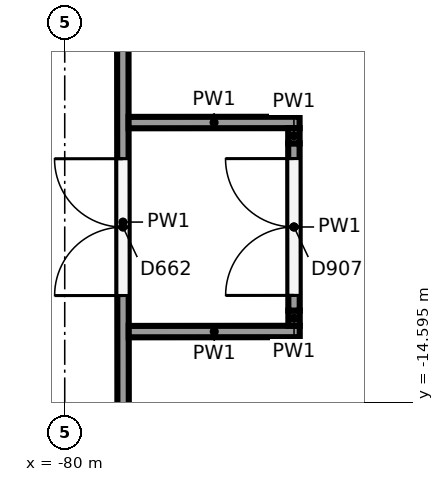
"""IFC4 building model, lengths in metres.
Left out: names, types, materials, properties, quantities, classifications, styles, units other than length and angle.
Written with IfcOpenShell. Run it as: python <this file> out.ifc"""

import sys

from ifc_helpers import new_model, si_unit, direction, frame, frame_2d, origin, place, context, subcontext, project, spatial, rectangle, extrude, element, fill, save


model = new_model("IFC4")
c1 = context("Model", 3, precision=1e-05, world=origin(), true_north=direction((0.0, 1.0)))
c2 = subcontext(c1, "Body", "Model", "MODEL_VIEW")
j1 = project(units=[si_unit("LENGTHUNIT", "METRE"), si_unit("PLANEANGLEUNIT", "RADIAN")], contexts=[c1])
p1 = place(None, origin())
s1 = spatial("IfcSite", under=j1, at=p1, CompositionType="ELEMENT")
p2 = place(p1, origin())
s2 = spatial("IfcBuilding", under=s1, at=p2, CompositionType="ELEMENT")
p3 = place(p2, frame((0.0, 0.0, 6.5)))
s3 = spatial("IfcBuildingStorey", under=s2, at=p3, CompositionType="ELEMENT", Elevation=6.5)
p4 = place(p3, frame((-79.23, -17.64, 0.0), z_axis=(0.0, 0.0, 1.0), x_axis=(-0.0007662833, 0.999999706405, 0.0)))
e1 = element("IfcWall", 1, at=p4, inside=s3, PredefinedType="PARTITIONING", context=c2, shape_type="SweptSolid", body=[
    extrude(rectangle(XDim=10.833, YDim=0.15, at=frame_2d((5.416, 0.0))), origin(), (0.0, 0.0, 1.0), 5.15),
])
p5 = place(p4, frame((4.45, 0.0, 0.0)))
e2 = element("IfcOpeningElement", 2, at=p5, cuts=e1, PredefinedType="OPENING", context=c2, shape_type="SweptSolid", body=[
    extrude(rectangle(XDim=1.8, YDim=2.1, at=frame_2d((0.9, 1.05))), frame((0.0, 0.085, 0.0), z_axis=(0.0, -1.0, 0.0), x_axis=(1.0, 0.0, 0.0)), (0.0, 0.0, 1.0), 0.17),
])
for number, where, z_axis, x_axis in (
    (3, (-79.158, -13.665, 0.0), (0.0, 0.0, 1.0), (1.0, 0.001, 0.0)),
    (4, (-79.16, -10.915, 0.0), (0.0, 0.0, 1.0), (1.0, 0.001, 0.0)),
):
    element("IfcWall", number, at=place(p3, frame(where, z_axis=z_axis, x_axis=x_axis)), inside=s3, PredefinedType="PARTITIONING", context=c2, shape_type="SweptSolid", body=[
        extrude(rectangle(XDim=2.25, YDim=0.15, at=frame_2d((1.125, 0.0))), origin(), (0.0, 0.0, 1.0), 5.15),
    ])
p6 = place(p3, frame((-76.983, -13.588, 0.0), z_axis=(0.0, 0.0, 1.0), x_axis=(0.0, 1.0, 0.0)))
e5 = element("IfcWall", 5, at=p6, inside=s3, PredefinedType="PARTITIONING", context=c2, shape_type="SweptSolid", body=[
    extrude(rectangle(XDim=0.2, YDim=0.15, at=frame_2d((0.1, 0.0))), origin(), (0.0, 0.0, 1.0), 5.15),
])
p7 = place(p3, frame((-76.983, -13.388, 0.0), z_axis=(0.0, 0.0, 1.0), x_axis=(-0.000776828087, 0.999999698269, 0.0)))
e6 = element("IfcWall", 6, at=p7, inside=s3, PredefinedType="PARTITIONING", context=c2, shape_type="SweptSolid", body=[
    extrude(rectangle(XDim=2.2, YDim=0.15, at=frame_2d((1.1, 0.0))), origin(), (0.0, 0.0, 1.0), 5.15),
])
p8 = place(p7, frame((0.2, 0.0, 0.0)))
e7 = element("IfcOpeningElement", 7, at=p8, cuts=e6, PredefinedType="OPENING", context=c2, shape_type="SweptSolid", body=[
    extrude(rectangle(XDim=1.8, YDim=2.1, at=frame_2d((0.9, 1.05))), frame((0.0, 0.085, 0.0), z_axis=(0.0, -1.0, 0.0), x_axis=(1.0, 0.0, 0.0)), (0.0, 0.0, 1.0), 0.17),
])
p9 = place(p3, frame((-76.985, -11.188, 0.0), z_axis=(0.0, 0.0, 1.0), x_axis=(-0.001221000311, 0.999999254579, 0.0)))
e8 = element("IfcWall", 8, at=p9, inside=s3, PredefinedType="PARTITIONING", context=c2, shape_type="SweptSolid", body=[
    extrude(rectangle(XDim=0.2, YDim=0.15, at=frame_2d((0.1, 0.0))), origin(), (0.0, 0.0, 1.0), 5.15),
])
p10 = place(p5, origin())
e9 = element("IfcDoor", 9, at=p10, inside=s3, OperationType="DOUBLE_DOOR_SINGLE_SWING", PredefinedType="DOOR", context=c2, shape_type="SweptSolid", body=[
    extrude(rectangle(XDim=1.8, YDim=2.1, at=frame_2d((0.9, 1.05))), frame((0.0, 0.025, 0.0), z_axis=(0.0, -1.0, 0.0), x_axis=(1.0, 0.0, 0.0)), (0.0, 0.0, 1.0), 0.05),
])
fill(e2, e9)
p11 = place(p8, origin())
e10 = element("IfcDoor", 10, at=p11, inside=s3, OperationType="DOUBLE_DOOR_SINGLE_SWING", PredefinedType="DOOR", context=c2, shape_type="SweptSolid", body=[
    extrude(rectangle(XDim=1.8, YDim=2.1, at=frame_2d((0.9, 1.05))), frame((0.0, 0.025, 0.0), z_axis=(0.0, -1.0, 0.0), x_axis=(1.0, 0.0, 0.0)), (0.0, 0.0, 1.0), 0.05),
])
fill(e7, e10)
save(model, sys.argv[1])
